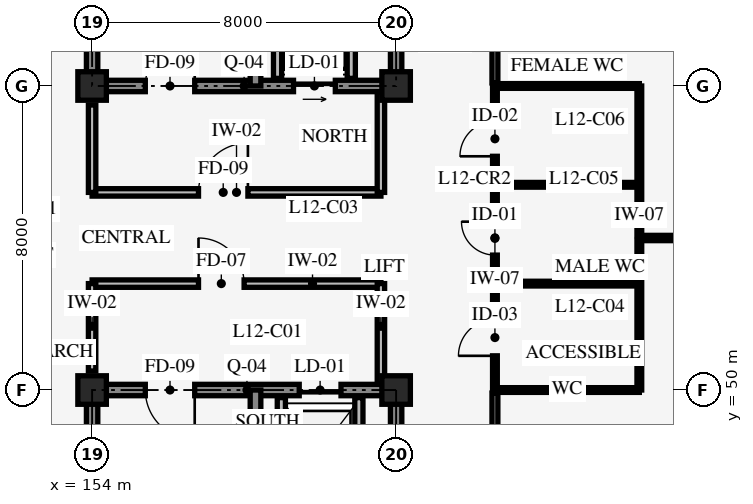
"""IFC4 building model, lengths in metres.
Left out: names, types, materials, properties, quantities, classifications, styles, units other than length and angle.
Written with IfcOpenShell. Run it as: python <this file> out.ifc"""

import sys

from ifc_helpers import new_model, si_unit, direction, frame, frame_2d, origin, origin_2d, place, context, subcontext, project, spatial, rectangle, extrude, element, fill, save


model = new_model("IFC4")
c1 = context("Model", 3, precision=1e-05, world=origin(), true_north=direction((0.0, 1.0)))
c2 = subcontext(c1, "Body", "Model", "MODEL_VIEW")
j1 = project(units=[si_unit("LENGTHUNIT", "METRE"), si_unit("PLANEANGLEUNIT", "RADIAN")], contexts=[c1])
p1 = place(None, origin())
s1 = spatial("IfcSite", under=j1, at=p1, CompositionType="ELEMENT")
p2 = place(p1, origin())
s2 = spatial("IfcBuilding", under=s1, at=p2, CompositionType="ELEMENT")
p3 = place(p2, frame((0.0, 0.0, 48.6)))
s3 = spatial("IfcBuildingStorey", under=s2, at=p3, CompositionType="ELEMENT", Elevation=48.6)
p4 = place(p3, frame((162.0, 42.0, 0.0), z_axis=(0.0, 0.0, 1.0), x_axis=(0.0, 1.0, 0.0)))
e1 = element("IfcWall", 1, at=p4, inside=s3, PredefinedType="SHEAR", context=c2, shape_type="SweptSolid", body=[
    extrude(rectangle(XDim=8.0, YDim=0.3, at=frame_2d((4.0, 0.0))), origin(), (0.0, 0.0, 1.0), 3.95),
])
p5 = place(p4, frame((3.175, 0.0, 0.0)))
e2 = element("IfcOpeningElement", 2, at=p5, cuts=e1, PredefinedType="OPENING", context=c2, shape_type="SweptSolid", body=[
    extrude(rectangle(XDim=1.05, YDim=2.2, at=frame_2d((0.525, 1.1))), frame((0.0, 0.16, 0.0), z_axis=(0.0, -1.0, 0.0), x_axis=(1.0, 0.0, 0.0)), (0.0, 0.0, 1.0), 0.32),
])
p6 = place(p3, frame((162.0, 50.0, 0.0), z_axis=(0.0, 0.0, 1.0), x_axis=(-1.0, 0.0, 0.0)))
e3 = element("IfcWall", 3, at=p6, inside=s3, PredefinedType="SHEAR", context=c2, shape_type="SweptSolid", body=[
    extrude(rectangle(XDim=8.0, YDim=0.3, at=frame_2d((4.0, 0.0))), origin(), (0.0, 0.0, 1.0), 3.95),
])
p7 = place(p6, frame((5.3, 0.0, 0.0)))
e4 = element("IfcOpeningElement", 4, at=p7, cuts=e3, PredefinedType="OPENING", context=c2, shape_type="SweptSolid", body=[
    extrude(rectangle(XDim=1.3, YDim=2.15, at=frame_2d((0.65, 1.075))), frame((0.0, 0.16, 0.0), z_axis=(0.0, -1.0, 0.0), x_axis=(1.0, 0.0, 0.0)), (0.0, 0.0, 1.0), 0.32),
])
p8 = place(p6, frame((1.45, 0.0, 0.0)))
e5 = element("IfcOpeningElement", 5, at=p8, cuts=e3, PredefinedType="OPENING", context=c2, shape_type="SweptSolid", body=[
    extrude(rectangle(XDim=1.1, YDim=2.2, at=frame_2d((0.55, 1.1))), frame((0.0, 0.16, 0.0), z_axis=(0.0, -1.0, 0.0), x_axis=(1.0, 0.0, 0.0)), (0.0, 0.0, 1.0), 0.32),
])
p9 = place(p3, frame((154.0, 50.0, 0.0), z_axis=(0.0, 0.0, 1.0), x_axis=(0.0, -1.0, 0.0)))
e6 = element("IfcWall", 6, at=p9, inside=s3, PredefinedType="SHEAR", context=c2, shape_type="SweptSolid", body=[
    extrude(rectangle(XDim=8.0, YDim=0.3, at=frame_2d((4.0, 0.0))), origin(), (0.0, 0.0, 1.0), 3.95),
])
p10 = place(p3, frame((158.3, 42.0, 0.0), z_axis=(0.0, 0.0, 1.0), x_axis=(0.0, 1.0, 0.0)))
e7 = element("IfcWall", 7, at=p10, inside=s3, PredefinedType="SHEAR", context=c2, shape_type="SweptSolid", body=[
    extrude(rectangle(XDim=8.0, YDim=0.28, at=frame_2d((4.0, 0.0))), origin(), (0.0, 0.0, 1.0), 3.95),
])
p11 = place(p3, frame((154.0, 58.0, 0.0), z_axis=(0.0, 0.0, 1.0), x_axis=(1.0, 0.0, 0.0)))
e8 = element("IfcWall", 8, at=p11, inside=s3, PredefinedType="SHEAR", context=c2, shape_type="SweptSolid", body=[
    extrude(rectangle(XDim=8.0, YDim=0.3, at=frame_2d((4.0, 0.0))), origin(), (0.0, 0.0, 1.0), 3.95),
])
p12 = place(p11, frame((1.4, 0.0, 0.0)))
e9 = element("IfcOpeningElement", 9, at=p12, cuts=e8, PredefinedType="OPENING", context=c2, shape_type="SweptSolid", body=[
    extrude(rectangle(XDim=1.3, YDim=2.15, at=frame_2d((0.65, 1.075))), frame((0.0, 0.16, 0.0), z_axis=(0.0, -1.0, 0.0), x_axis=(1.0, 0.0, 0.0)), (0.0, 0.0, 1.0), 0.32),
])
p13 = place(p11, frame((5.3, 0.0, 0.0)))
e10 = element("IfcOpeningElement", 10, at=p13, cuts=e8, PredefinedType="OPENING", context=c2, shape_type="SweptSolid", body=[
    extrude(rectangle(XDim=1.1, YDim=2.2, at=frame_2d((0.55, 1.1))), frame((0.0, 0.16, 0.0), z_axis=(0.0, -1.0, 0.0), x_axis=(1.0, 0.0, 0.0)), (0.0, 0.0, 1.0), 0.32),
])
p14 = place(p3, frame((162.0, 58.0, 0.0), z_axis=(0.0, 0.0, 1.0), x_axis=(0.0, 1.0, 0.0)))
e11 = element("IfcWall", 11, at=p14, inside=s3, PredefinedType="SHEAR", context=c2, shape_type="SweptSolid", body=[
    extrude(rectangle(XDim=8.0, YDim=0.3, at=frame_2d((4.0, 0.0))), origin(), (0.0, 0.0, 1.0), 3.95),
])
p15 = place(p14, frame((3.275, 0.0, 0.0)))
e12 = element("IfcOpeningElement", 12, at=p15, cuts=e11, PredefinedType="OPENING", context=c2, shape_type="SweptSolid", body=[
    extrude(rectangle(XDim=1.05, YDim=2.2, at=frame_2d((0.525, 1.1))), frame((0.0, 0.16, 0.0), z_axis=(0.0, -1.0, 0.0), x_axis=(1.0, 0.0, 0.0)), (0.0, 0.0, 1.0), 0.32),
])
p16 = place(p14, frame((5.45, 0.0, 0.0)))
e13 = element("IfcOpeningElement", 13, at=p16, cuts=e11, PredefinedType="OPENING", context=c2, shape_type="SweptSolid", body=[
    extrude(rectangle(XDim=1.4, YDim=2.3, at=frame_2d((0.7, 1.15))), frame((0.0, 0.16, 0.0), z_axis=(0.0, -1.0, 0.0), x_axis=(1.0, 0.0, 0.0)), (0.0, 0.0, 1.0), 0.32),
])
p17 = place(p3, frame((154.0, 66.0, 0.0), z_axis=(0.0, 0.0, 1.0), x_axis=(0.0, -1.0, 0.0)))
e14 = element("IfcWall", 14, at=p17, inside=s3, PredefinedType="SHEAR", context=c2, shape_type="SweptSolid", body=[
    extrude(rectangle(XDim=8.0, YDim=0.3, at=frame_2d((4.0, 0.0))), origin(), (0.0, 0.0, 1.0), 3.95),
])
p18 = place(p3, frame((158.3, 58.0, 0.0), z_axis=(0.0, 0.0, 1.0), x_axis=(0.0, 1.0, 0.0)))
e15 = element("IfcWall", 15, at=p18, inside=s3, PredefinedType="SHEAR", context=c2, shape_type="SweptSolid", body=[
    extrude(rectangle(XDim=8.0, YDim=0.28, at=frame_2d((4.0, 0.0))), origin(), (0.0, 0.0, 1.0), 3.95),
])
for number, where, z_axis, x_axis in (
    (16, (154.0, 50.0, 0.0), (0.0, 0.0, 1.0), (1.0, 0.0, 0.0)),
    (17, (154.0, 58.0, 0.0), (0.0, 0.0, 1.0), (1.0, 0.0, 0.0)),
    (18, (162.0, 50.0, 0.0), (0.0, 0.0, 1.0), (1.0, 0.0, 0.0)),
    (19, (162.0, 58.0, 0.0), (0.0, 0.0, 1.0), (1.0, 0.0, 0.0)),
):
    element("IfcColumn", number, at=place(p3, frame(where, z_axis=z_axis, x_axis=x_axis)), inside=s3, PredefinedType="COLUMN", context=c2, shape_type="SweptSolid", body=[
        extrude(rectangle(XDim=0.75, YDim=0.75, at=origin_2d()), origin(), (0.0, 0.0, 1.0), 4.2),
    ])
for number, where, z_axis, x_axis in (
    (20, (158.98, 47.02, 0.0), (0.0, 0.0, 1.0), (0.0, 1.0, 0.0)),
    (21, (161.02, 47.02, 0.0), (0.0, 0.0, 1.0), (0.0, 1.0, 0.0)),
):
    element("IfcWall", number, at=place(p3, frame(where, z_axis=z_axis, x_axis=x_axis)), inside=s3, PredefinedType="STANDARD", context=c2, shape_type="SweptSolid", body=[
        extrude(rectangle(XDim=2.78, YDim=0.215, at=frame_2d((1.39, 0.0))), origin(), (0.0, 0.0, 1.0), 3.9),
    ])
for number, where, z_axis, x_axis in (
    (22, (160.82, 58.2, 0.0), (0.0, 0.0, 1.0), (0.0, 1.0, 0.0)),
    (23, (158.88, 58.2, 0.0), (0.0, 0.0, 1.0), (0.0, 1.0, 0.0)),
):
    element("IfcWall", number, at=place(p3, frame(where, z_axis=z_axis, x_axis=x_axis)), inside=s3, PredefinedType="STANDARD", context=c2, shape_type="SweptSolid", body=[
        extrude(rectangle(XDim=2.55, YDim=0.215, at=frame_2d((1.275, 0.0))), origin(), (0.0, 0.0, 1.0), 3.9),
    ])
p19 = place(p3, frame((154.0, 52.8, 0.0), z_axis=(0.0, 0.0, 1.0), x_axis=(1.0, 0.0, 0.0)))
e24 = element("IfcWall", 24, at=p19, inside=s3, PredefinedType="STANDARD", context=c2, shape_type="SweptSolid", body=[
    extrude(rectangle(XDim=7.6, YDim=0.195, at=frame_2d((3.8, 0.0))), origin(), (0.0, 0.0, 1.0), 3.9),
])
p20 = place(p19, frame((2.8, 0.0, 0.0)))
e25 = element("IfcOpeningElement", 25, at=p20, cuts=e24, PredefinedType="OPENING", context=c2, shape_type="SweptSolid", body=[
    extrude(rectangle(XDim=1.2, YDim=2.1, at=frame_2d((0.6, 1.05))), frame((0.0, 0.107, 0.0), z_axis=(0.0, -1.0, 0.0), x_axis=(1.0, 0.0, 0.0)), (0.0, 0.0, 1.0), 0.215),
])
p21 = place(p3, frame((161.6, 50.15, 0.0), z_axis=(0.0, 0.0, 1.0), x_axis=(0.0, 1.0, 0.0)))
e26 = element("IfcWall", 26, at=p21, inside=s3, PredefinedType="STANDARD", context=c2, shape_type="SweptSolid", body=[
    extrude(rectangle(XDim=2.65, YDim=0.195, at=frame_2d((1.325, 0.0))), origin(), (0.0, 0.0, 1.0), 3.24),
])
p22 = place(p3, frame((154.0, 50.5, 0.0), z_axis=(0.0, 0.0, 1.0), x_axis=(0.0, 1.0, 0.0)))
e27 = element("IfcWall", 27, at=p22, inside=s3, PredefinedType="STANDARD", context=c2, shape_type="SweptSolid", body=[
    extrude(rectangle(XDim=2.3, YDim=0.195, at=frame_2d((1.15, 0.0))), origin(), (0.0, 0.0, 1.0), 3.24),
])
p23 = place(p3, frame((154.0, 55.2, 0.0), z_axis=(0.0, 0.0, 1.0), x_axis=(1.0, 0.0, 0.0)))
e28 = element("IfcWall", 28, at=p23, inside=s3, PredefinedType="STANDARD", context=c2, shape_type="SweptSolid", body=[
    extrude(rectangle(XDim=7.6, YDim=0.195, at=frame_2d((3.8, 0.0))), origin(), (0.0, 0.0, 1.0), 3.9),
])
p24 = place(p23, frame((2.8, 0.0, 0.0)))
e29 = element("IfcOpeningElement", 29, at=p24, cuts=e28, PredefinedType="OPENING", context=c2, shape_type="SweptSolid", body=[
    extrude(rectangle(XDim=1.3, YDim=2.15, at=frame_2d((0.65, 1.075))), frame((0.0, 0.107, 0.0), z_axis=(0.0, -1.0, 0.0), x_axis=(1.0, 0.0, 0.0)), (0.0, 0.0, 1.0), 0.215),
])
p25 = place(p3, frame((161.6, 55.2, 0.0), z_axis=(0.0, 0.0, 1.0), x_axis=(0.0, 1.0, 0.0)))
e30 = element("IfcWall", 30, at=p25, inside=s3, PredefinedType="STANDARD", context=c2, shape_type="SweptSolid", body=[
    extrude(rectangle(XDim=2.65, YDim=0.195, at=frame_2d((1.325, 0.0))), origin(), (0.0, 0.0, 1.0), 3.24),
])
p26 = place(p3, frame((154.0, 55.2, 0.0), z_axis=(0.0, 0.0, 1.0), x_axis=(0.0, 1.0, 0.0)))
e31 = element("IfcWall", 31, at=p26, inside=s3, PredefinedType="STANDARD", context=c2, shape_type="SweptSolid", body=[
    extrude(rectangle(XDim=2.3, YDim=0.195, at=frame_2d((1.15, 0.0))), origin(), (0.0, 0.0, 1.0), 3.24),
])
p27 = place(p3, frame((164.6, 50.0, 0.0), z_axis=(0.0, 0.0, 1.0), x_axis=(0.0, 1.0, 0.0)))
e32 = element("IfcWall", 32, at=p27, inside=s3, PredefinedType="STANDARD", context=c2, shape_type="SweptSolid", body=[
    extrude(rectangle(XDim=8.0, YDim=0.125, at=frame_2d((4.0, 0.0))), origin(), (0.0, 0.0, 1.0), 3.9),
])
p28 = place(p27, frame((0.9, 0.0, 0.0)))
e33 = element("IfcOpeningElement", 33, at=p28, cuts=e32, PredefinedType="OPENING", context=c2, shape_type="SweptSolid", body=[
    extrude(rectangle(XDim=0.96, YDim=2.08, at=frame_2d((0.48, 1.04))), frame((0.0, 0.073, 0.0), z_axis=(0.0, -1.0, 0.0), x_axis=(1.0, 0.0, 0.0)), (0.0, 0.0, 1.0), 0.145),
])
p29 = place(p27, frame((3.55, 0.0, 0.0)))
e34 = element("IfcOpeningElement", 34, at=p29, cuts=e32, PredefinedType="OPENING", context=c2, shape_type="SweptSolid", body=[
    extrude(rectangle(XDim=0.88, YDim=2.05, at=frame_2d((0.44, 1.025))), frame((0.0, 0.073, 0.0), z_axis=(0.0, -1.0, 0.0), x_axis=(1.0, 0.0, 0.0)), (0.0, 0.0, 1.0), 0.145),
])
p30 = place(p27, frame((6.15, 0.0, 0.0)))
e35 = element("IfcOpeningElement", 35, at=p30, cuts=e32, PredefinedType="OPENING", context=c2, shape_type="SweptSolid", body=[
    extrude(rectangle(XDim=0.92, YDim=2.05, at=frame_2d((0.46, 1.025))), frame((0.0, 0.073, 0.0), z_axis=(0.0, -1.0, 0.0), x_axis=(1.0, 0.0, 0.0)), (0.0, 0.0, 1.0), 0.145),
])
p31 = place(p3, frame((168.4, 50.0, 0.0), z_axis=(0.0, 0.0, 1.0), x_axis=(0.0, 1.0, 0.0)))
e36 = element("IfcWall", 36, at=p31, inside=s3, PredefinedType="STANDARD", context=c2, shape_type="SweptSolid", body=[
    extrude(rectangle(XDim=8.0, YDim=0.125, at=frame_2d((4.0, 0.0))), origin(), (0.0, 0.0, 1.0), 3.9),
])
p32 = place(p3, frame((164.6, 50.0, 0.0), z_axis=(0.0, 0.0, 1.0), x_axis=(1.0, 0.0, 0.0)))
e37 = element("IfcWall", 37, at=p32, inside=s3, PredefinedType="STANDARD", context=c2, shape_type="SweptSolid", body=[
    extrude(rectangle(XDim=3.8, YDim=0.125, at=frame_2d((1.9, 0.0))), origin(), (0.0, 0.0, 1.0), 3.19),
])
for number, where, z_axis, x_axis in (
    (38, (164.6, 52.8, 0.0), (0.0, 0.0, 1.0), (1.0, 0.0, 0.0)),
    (39, (164.6, 55.4, 0.0), (0.0, 0.0, 1.0), (1.0, 0.0, 0.0)),
):
    element("IfcWall", number, at=place(p3, frame(where, z_axis=z_axis, x_axis=x_axis)), inside=s3, PredefinedType="STANDARD", context=c2, shape_type="SweptSolid", body=[
        extrude(rectangle(XDim=3.8, YDim=0.125, at=frame_2d((1.9, 0.0))), origin(), (0.0, 0.0, 1.0), 3.9),
    ])
p33 = place(p3, frame((164.6, 58.0, 0.0), z_axis=(0.0, 0.0, 1.0), x_axis=(1.0, 0.0, 0.0)))
e40 = element("IfcWall", 40, at=p33, inside=s3, PredefinedType="STANDARD", context=c2, shape_type="SweptSolid", body=[
    extrude(rectangle(XDim=3.8, YDim=0.125, at=frame_2d((1.9, 0.0))), origin(), (0.0, 0.0, 1.0), 3.19),
])
p34 = place(p3, frame((164.6, 42.12, 0.0), z_axis=(0.0, 0.0, 1.0), x_axis=(0.0, 1.0, 0.0)))
e41 = element("IfcWall", 41, at=p34, inside=s3, PredefinedType="STANDARD", context=c2, shape_type="SweptSolid", body=[
    extrude(rectangle(XDim=7.8, YDim=0.155, at=frame_2d((3.9, 0.0))), origin(), (0.0, 0.0, 1.0), 3.9),
])
p35 = place(p34, frame((3.275, 0.0, 0.0)))
e42 = element("IfcOpeningElement", 42, at=p35, cuts=e41, PredefinedType="OPENING", context=c2, shape_type="SweptSolid", body=[
    extrude(rectangle(XDim=1.25, YDim=2.15, at=frame_2d((0.625, 1.075))), frame((0.0, 0.087, 0.0), z_axis=(0.0, -1.0, 0.0), x_axis=(1.0, 0.0, 0.0)), (0.0, 0.0, 1.0), 0.175),
])
p36 = place(p3, frame((168.4, 54.0, 0.0), z_axis=(0.0, 0.0, 1.0), x_axis=(1.0, 0.0, 0.0)))
e43 = element("IfcWall", 43, at=p36, inside=s3, PredefinedType="STANDARD", context=c2, shape_type="SweptSolid", body=[
    extrude(rectangle(XDim=8.96, YDim=0.14, at=frame_2d((4.48, 0.0))), origin(), (0.0, 0.0, 1.0), 3.9),
])
p37 = place(p36, frame((3.61, 0.0, 0.0)))
e44 = element("IfcOpeningElement", 44, at=p37, cuts=e43, PredefinedType="OPENING", context=c2, shape_type="SweptSolid", body=[
    extrude(rectangle(XDim=1.74, YDim=2.26, at=frame_2d((0.87, 1.13))), frame((0.0, 0.08, 0.0), z_axis=(0.0, -1.0, 0.0), x_axis=(1.0, 0.0, 0.0)), (0.0, 0.0, 1.0), 0.16),
])
p38 = place(p3, frame((164.6, 58.08, 0.0), z_axis=(0.0, 0.0, 1.0), x_axis=(0.0, 1.0, 0.0)))
e45 = element("IfcWall", 45, at=p38, inside=s3, PredefinedType="STANDARD", context=c2, shape_type="SweptSolid", body=[
    extrude(rectangle(XDim=7.87, YDim=0.155, at=frame_2d((3.935, 0.0))), origin(), (0.0, 0.0, 1.0), 3.9),
])
p39 = place(p38, frame((3.285, 0.0, 0.0)))
e46 = element("IfcOpeningElement", 46, at=p39, cuts=e45, PredefinedType="OPENING", context=c2, shape_type="SweptSolid", body=[
    extrude(rectangle(XDim=1.3, YDim=2.15, at=frame_2d((0.65, 1.075))), frame((0.0, 0.087, 0.0), z_axis=(0.0, -1.0, 0.0), x_axis=(1.0, 0.0, 0.0)), (0.0, 0.0, 1.0), 0.175),
])
p40 = place(p7, origin())
e47 = element("IfcDoor", 47, at=p40, inside=s3, OperationType="SINGLE_SWING_LEFT", PredefinedType="DOOR", context=c2, shape_type="SweptSolid", body=[
    extrude(rectangle(XDim=1.3, YDim=2.15, at=frame_2d((0.65, 1.075))), frame((0.0, 0.025, 0.0), z_axis=(0.0, -1.0, 0.0), x_axis=(1.0, 0.0, 0.0)), (0.0, 0.0, 1.0), 0.05),
])
fill(e4, e47)
p41 = place(p8, origin())
e48 = element("IfcDoor", 48, at=p41, inside=s3, OperationType="SLIDING_TO_LEFT", PredefinedType="DOOR", context=c2, shape_type="SweptSolid", body=[
    extrude(rectangle(XDim=1.1, YDim=2.2, at=frame_2d((0.55, 1.1))), frame((0.0, 0.025, 0.0), z_axis=(0.0, -1.0, 0.0), x_axis=(1.0, 0.0, 0.0)), (0.0, 0.0, 1.0), 0.05),
])
fill(e5, e48)
p42 = place(p12, origin())
e49 = element("IfcDoor", 49, at=p42, inside=s3, OperationType="SINGLE_SWING_RIGHT", PredefinedType="DOOR", context=c2, shape_type="SweptSolid", body=[
    extrude(rectangle(XDim=1.3, YDim=2.15, at=frame_2d((0.65, 1.075))), frame((0.0, 0.025, 0.0), z_axis=(0.0, -1.0, 0.0), x_axis=(1.0, 0.0, 0.0)), (0.0, 0.0, 1.0), 0.05),
])
fill(e9, e49)
p43 = place(p13, origin())
e50 = element("IfcDoor", 50, at=p43, inside=s3, OperationType="SLIDING_TO_RIGHT", PredefinedType="DOOR", context=c2, shape_type="SweptSolid", body=[
    extrude(rectangle(XDim=1.1, YDim=2.2, at=frame_2d((0.55, 1.1))), frame((0.0, 0.025, 0.0), z_axis=(0.0, -1.0, 0.0), x_axis=(1.0, 0.0, 0.0)), (0.0, 0.0, 1.0), 0.05),
])
fill(e10, e50)
p44 = place(p20, origin())
e51 = element("IfcDoor", 51, at=p44, inside=s3, OperationType="SINGLE_SWING_LEFT", PredefinedType="DOOR", context=c2, shape_type="SweptSolid", body=[
    extrude(rectangle(XDim=1.2, YDim=2.1, at=frame_2d((0.6, 1.05))), frame((0.0, 0.025, 0.0), z_axis=(0.0, -1.0, 0.0), x_axis=(1.0, 0.0, 0.0)), (0.0, 0.0, 1.0), 0.05),
])
fill(e25, e51)
p45 = place(p24, origin())
e52 = element("IfcDoor", 52, at=p45, inside=s3, OperationType="SINGLE_SWING_RIGHT", PredefinedType="DOOR", context=c2, shape_type="SweptSolid", body=[
    extrude(rectangle(XDim=1.3, YDim=2.15, at=frame_2d((0.65, 1.075))), frame((0.0, 0.025, 0.0), z_axis=(0.0, -1.0, 0.0), x_axis=(1.0, 0.0, 0.0)), (0.0, 0.0, 1.0), 0.05),
])
fill(e29, e52)
p46 = place(p28, origin())
e53 = element("IfcDoor", 53, at=p46, inside=s3, OperationType="SINGLE_SWING_LEFT", PredefinedType="DOOR", context=c2, shape_type="SweptSolid", body=[
    extrude(rectangle(XDim=0.96, YDim=2.08, at=frame_2d((0.48, 1.04))), frame((0.0, 0.025, 0.0), z_axis=(0.0, -1.0, 0.0), x_axis=(1.0, 0.0, 0.0)), (0.0, 0.0, 1.0), 0.05),
])
fill(e33, e53)
p47 = place(p29, origin())
e54 = element("IfcDoor", 54, at=p47, inside=s3, OperationType="SINGLE_SWING_RIGHT", PredefinedType="DOOR", context=c2, shape_type="SweptSolid", body=[
    extrude(rectangle(XDim=0.88, YDim=2.05, at=frame_2d((0.44, 1.025))), frame((0.0, 0.025, 0.0), z_axis=(0.0, -1.0, 0.0), x_axis=(1.0, 0.0, 0.0)), (0.0, 0.0, 1.0), 0.05),
])
fill(e34, e54)
p48 = place(p30, origin())
e55 = element("IfcDoor", 55, at=p48, inside=s3, OperationType="SINGLE_SWING_LEFT", PredefinedType="DOOR", context=c2, shape_type="SweptSolid", body=[
    extrude(rectangle(XDim=0.92, YDim=2.05, at=frame_2d((0.46, 1.025))), frame((0.0, 0.025, 0.0), z_axis=(0.0, -1.0, 0.0), x_axis=(1.0, 0.0, 0.0)), (0.0, 0.0, 1.0), 0.05),
])
fill(e35, e55)
save(model, sys.argv[1])
